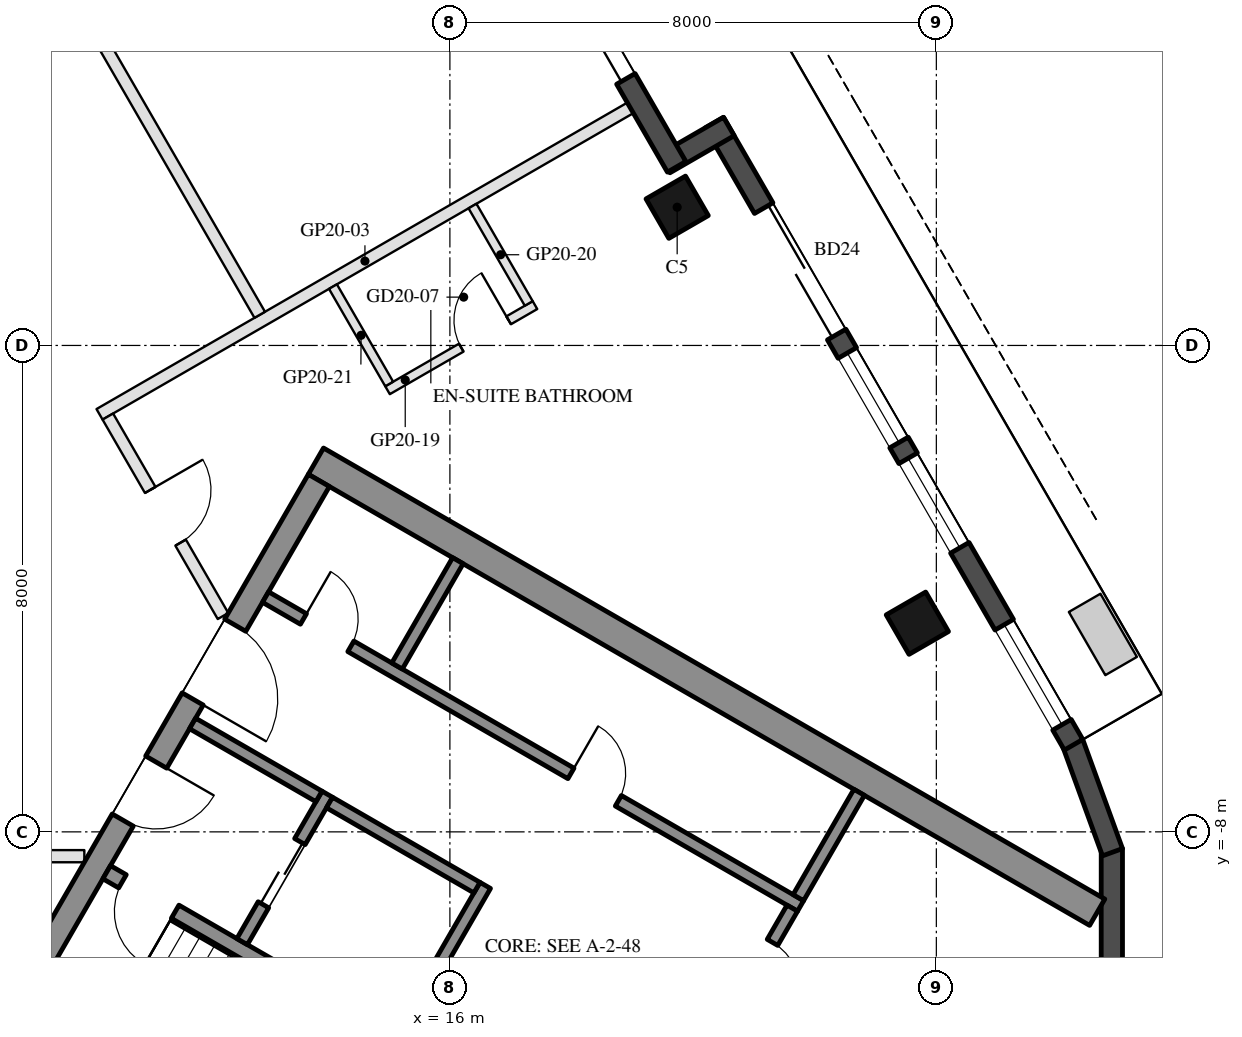
"""IFC4 building model, lengths in metres.
Left out: names, types, materials, properties, quantities, classifications, styles, units other than length and angle.
Written with IfcOpenShell. Run it as: python <this file> out.ifc"""

import sys

from ifc_helpers import new_model, si_unit, direction, frame, frame_2d, origin, origin_2d, place, context, subcontext, project, spatial, rectangle, hollow_rectangle, extrude, element, fill, save


model = new_model("IFC4")
c1 = context("Model", 3, precision=1e-05, world=origin(), true_north=direction((0.0, 1.0)))
c2 = subcontext(c1, "Body", "Model", "MODEL_VIEW")
j1 = project(units=[si_unit("LENGTHUNIT", "METRE"), si_unit("PLANEANGLEUNIT", "RADIAN")], contexts=[c1])
p1 = place(None, origin())
s1 = spatial("IfcSite", under=j1, at=p1, CompositionType="ELEMENT")
p2 = place(p1, origin())
s2 = spatial("IfcBuilding", under=s1, at=p2, CompositionType="ELEMENT")
p3 = place(p2, frame((0.0, 0.0, 209.5)))
s3 = spatial("IfcBuildingStorey", under=s2, at=p3, CompositionType="ELEMENT", Elevation=209.5)
for number, where, z_axis, x_axis in (
    (1, (23.688, -4.568, 0.0), (0.0, 0.0, 1.0), (-0.5, 0.866, 0.0)),
    (2, (19.738, 2.273, 0.0), (0.0, 0.0, 1.0), (-0.5, 0.866, 0.0)),
):
    element("IfcColumn", number, at=place(p3, frame(where, z_axis=z_axis, x_axis=x_axis)), inside=s3, PredefinedType="COLUMN", context=c2, shape_type="SweptSolid", body=[
        extrude(hollow_rectangle(XDim=0.75, YDim=0.75, WallThickness=0.035, at=origin_2d()), origin(), (0.0, 0.0, 1.0), 3.7),
    ])
for number, where, z_axis, x_axis in (
    (3, (26.244, -11.92, 0.0), (0.0, 0.0, 1.0), (0.342, 0.94, 0.0)),
    (4, (26.886, -10.185, 0.0), (0.0, 0.0, 1.0), (0.0, 1.0, 0.0)),
    (5, (26.897, -8.335, 0.0), (0.0, 0.0, 1.0), (-0.342, 0.94, 0.0)),
):
    element("IfcWall", number, at=place(p3, frame(where, z_axis=z_axis, x_axis=x_axis)), inside=s3, PredefinedType="SOLIDWALL", context=c2, shape_type="SweptSolid", body=[
        extrude(rectangle(XDim=1.91, YDim=0.35, at=frame_2d((0.955, 0.0))), origin(), (0.0, 0.0, 1.0), 3.55),
    ])
p4 = place(p3, frame((26.257, -6.567, 0.0), z_axis=(0.0, 0.0, 1.0), x_axis=(-0.500023526245, 0.866011820475, 0.0)))
e6 = element("IfcWall", 6, at=p4, inside=s3, PredefinedType="SOLIDWALL", context=c2, shape_type="SweptSolid", body=[
    extrude(rectangle(XDim=11.816, YDim=0.35, at=frame_2d((5.908, 0.0))), origin(), (0.0, 0.0, 1.0), 3.55),
])
p5 = place(p4, frame((0.38, 0.0, 0.3)))
e7 = element("IfcOpeningElement", 7, at=p5, cuts=e6, PredefinedType="OPENING", context=c2, shape_type="SweptSolid", body=[
    extrude(rectangle(XDim=1.9, YDim=2.65, at=frame_2d((0.95, 1.325))), frame((0.0, 0.185, 0.0), z_axis=(0.0, -1.0, 0.0), x_axis=(1.0, 0.0, 0.0)), (0.0, 0.0, 1.0), 0.37),
])
p6 = place(p4, frame((7.791, 0.0, 0.0)))
e8 = element("IfcOpeningElement", 8, at=p6, cuts=e6, PredefinedType="OPENING", context=c2, shape_type="SweptSolid", body=[
    extrude(rectangle(XDim=2.4, YDim=2.4, at=frame_2d((1.2, 1.2))), frame((0.0, 0.185, 0.0), z_axis=(0.0, -1.0, 0.0), x_axis=(1.0, 0.0, 0.0)), (0.0, 0.0, 1.0), 0.37),
])
p7 = place(p4, frame((3.741, 0.0, 0.3)))
e9 = element("IfcOpeningElement", 9, at=p7, cuts=e6, PredefinedType="OPENING", context=c2, shape_type="SweptSolid", body=[
    extrude(rectangle(XDim=1.7, YDim=2.65, at=frame_2d((0.85, 1.325))), frame((0.0, 0.185, 0.0), z_axis=(0.0, -1.0, 0.0), x_axis=(1.0, 0.0, 0.0)), (0.0, 0.0, 1.0), 0.37),
])
p8 = place(p4, frame((5.741, 0.0, 0.3)))
e10 = element("IfcOpeningElement", 10, at=p8, cuts=e6, PredefinedType="OPENING", context=c2, shape_type="SweptSolid", body=[
    extrude(rectangle(XDim=1.7, YDim=2.65, at=frame_2d((0.85, 1.325))), frame((0.0, 0.185, 0.0), z_axis=(0.0, -1.0, 0.0), x_axis=(1.0, 0.0, 0.0)), (0.0, 0.0, 1.0), 0.37),
])
p9 = place(p3, frame((20.588, 3.601, 0.0), z_axis=(0.0, 0.0, 1.0), x_axis=(-0.866005645448, -0.500034220881, 0.0)))
e11 = element("IfcWall", 11, at=p9, inside=s3, PredefinedType="SOLIDWALL", context=c2, shape_type="SweptSolid", body=[
    extrude(rectangle(XDim=1.22, YDim=0.35, at=frame_2d((0.61, 0.0))), origin(), (0.0, 0.0, 1.0), 3.55),
])
p10 = place(p3, frame((19.729, 2.938, 0.0), z_axis=(0.0, 0.0, 1.0), x_axis=(-0.499976430342, 0.866039011305, 0.0)))
e12 = element("IfcWall", 12, at=p10, inside=s3, PredefinedType="SOLIDWALL", context=c2, shape_type="SweptSolid", body=[
    extrude(rectangle(XDim=6.74, YDim=0.35, at=frame_2d((3.37, 0.0))), origin(), (0.0, 0.0, 1.0), 3.55),
])
p11 = place(p10, frame((1.67, 0.0, 0.0)))
e13 = element("IfcOpeningElement", 13, at=p11, cuts=e12, PredefinedType="OPENING", context=c2, shape_type="SweptSolid", body=[
    extrude(rectangle(XDim=2.4, YDim=2.4, at=frame_2d((1.2, 1.2))), frame((0.0, 0.185, 0.0), z_axis=(0.0, -1.0, 0.0), x_axis=(1.0, 0.0, 0.0)), (0.0, 0.0, 1.0), 0.37),
])
p12 = place(p10, frame((4.37, 0.0, 0.3)))
e14 = element("IfcOpeningElement", 14, at=p12, cuts=e12, PredefinedType="OPENING", context=c2, shape_type="SweptSolid", body=[
    extrude(rectangle(XDim=1.5, YDim=2.65, at=frame_2d((0.75, 1.325))), frame((0.0, 0.185, 0.0), z_axis=(0.0, -1.0, 0.0), x_axis=(1.0, 0.0, 0.0)), (0.0, 0.0, 1.0), 0.37),
])
p13 = place(p3, frame((13.797, -1.903, 0.0), z_axis=(0.0, 0.0, 1.0), x_axis=(0.866025009528, -0.500000682871, 0.0)))
e15 = element("IfcWall", 15, at=p13, inside=s3, PredefinedType="SHEAR", context=c2, shape_type="SweptSolid", body=[
    extrude(rectangle(XDim=14.837, YDim=0.5, at=frame_2d((7.418, 0.0))), origin(), (0.0, 0.0, 1.0), 3.5),
])
p14 = place(p3, frame((8.845, -10.88, 0.0), z_axis=(0.0, 0.0, 1.0), x_axis=(0.500004234368, 0.866022959057, 0.0)))
e16 = element("IfcWall", 16, at=p14, inside=s3, PredefinedType="SHEAR", context=c2, shape_type="SweptSolid", body=[
    extrude(rectangle(XDim=10.0, YDim=0.4, at=frame_2d((5.0, 0.0))), origin(), (0.0, 0.0, 1.0), 3.5),
])
p15 = place(p14, frame((3.55, 0.0, 0.0)))
e17 = element("IfcOpeningElement", 17, at=p15, cuts=e16, PredefinedType="OPENING", context=c2, shape_type="SweptSolid", body=[
    extrude(rectangle(XDim=1.1, YDim=2.1, at=frame_2d((0.55, 1.05))), frame((0.0, 0.21, 0.0), z_axis=(0.0, -1.0, 0.0), x_axis=(1.0, 0.0, 0.0)), (0.0, 0.0, 1.0), 0.42),
])
p16 = place(p14, frame((5.85, 0.0, 0.0)))
e18 = element("IfcOpeningElement", 18, at=p16, cuts=e16, PredefinedType="OPENING", context=c2, shape_type="SweptSolid", body=[
    extrude(rectangle(XDim=1.4, YDim=2.1, at=frame_2d((0.7, 1.05))), frame((0.0, 0.21, 0.0), z_axis=(0.0, -1.0, 0.0), x_axis=(1.0, 0.0, 0.0)), (0.0, 0.0, 1.0), 0.42),
])
p17 = place(p3, frame((10.356, -8.664, 0.0), z_axis=(0.0, 0.0, 1.0), x_axis=(0.866028629588, -0.499994412703, 0.0)))
e19 = element("IfcWall", 19, at=p17, inside=s3, PredefinedType="SHEAR", context=c2, shape_type="SweptSolid", body=[
    extrude(rectangle(XDim=6.45, YDim=0.25, at=frame_2d((3.225, 0.0))), origin(), (0.0, 0.0, 1.0), 3.5),
])
p18 = place(p17, frame((0.3, 0.0, 0.0)))
e20 = element("IfcOpeningElement", 20, at=p18, cuts=e19, PredefinedType="OPENING", context=c2, shape_type="SweptSolid", body=[
    extrude(rectangle(XDim=1.0, YDim=2.1, at=frame_2d((0.5, 1.05))), frame((0.0, 0.135, 0.0), z_axis=(0.0, -1.0, 0.0), x_axis=(1.0, 0.0, 0.0)), (0.0, 0.0, 1.0), 0.27),
])
p19 = place(p3, frame((15.181, -11.305, 0.0), z_axis=(0.0, 0.0, 1.0), x_axis=(0.49994636267, 0.866056369097, 0.0)))
e21 = element("IfcWall", 21, at=p19, inside=s3, PredefinedType="SHEAR", context=c2, shape_type="SweptSolid", body=[
    extrude(rectangle(XDim=2.8, YDim=0.2, at=frame_2d((1.4, 0.0))), origin(), (0.0, 0.0, 1.0), 3.5),
])
p20 = place(p3, frame((12.583, -9.805, 0.0), z_axis=(0.0, 0.0, 1.0), x_axis=(0.49994636267, 0.866056369097, 0.0)))
e22 = element("IfcWall", 22, at=p20, inside=s3, PredefinedType="SHEAR", context=c2, shape_type="SweptSolid", body=[
    extrude(rectangle(XDim=2.8, YDim=0.2, at=frame_2d((1.4, 0.0))), origin(), (0.0, 0.0, 1.0), 3.5),
])
p21 = place(p20, frame((0.7, 0.0, 0.0)))
e23 = element("IfcOpeningElement", 23, at=p21, cuts=e22, PredefinedType="OPENING", context=c2, shape_type="SweptSolid", body=[
    extrude(rectangle(XDim=1.2, YDim=2.1, at=frame_2d((0.6, 1.05))), frame((0.0, 0.11, 0.0), z_axis=(0.0, -1.0, 0.0), x_axis=(1.0, 0.0, 0.0)), (0.0, 0.0, 1.0), 0.22),
])
p22 = place(p3, frame((11.768, -6.217, 0.0), z_axis=(0.0, 0.0, 1.0), x_axis=(0.866050077142, -0.499957262057, 0.0)))
e24 = element("IfcWall", 24, at=p22, inside=s3, PredefinedType="SHEAR", context=c2, shape_type="SweptSolid", body=[
    extrude(rectangle(XDim=2.4, YDim=0.2, at=frame_2d((1.2, 0.0))), origin(), (0.0, 0.0, 1.0), 3.5),
])
p23 = place(p3, frame((14.02, -7.517, 0.0), z_axis=(0.0, 0.0, 1.0), x_axis=(0.866034573852, -0.49998411664, 0.0)))
e25 = element("IfcWall", 25, at=p23, inside=s3, PredefinedType="SHEAR", context=c2, shape_type="SweptSolid", body=[
    extrude(rectangle(XDim=2.8, YDim=0.2, at=frame_2d((1.4, 0.0))), origin(), (0.0, 0.0, 1.0), 3.5),
])
p24 = place(p3, frame((12.968, -4.138, 0.0), z_axis=(0.0, 0.0, 1.0), x_axis=(0.866028328073, -0.49999493495, 0.0)))
e26 = element("IfcWall", 26, at=p24, inside=s3, PredefinedType="SHEAR", context=c2, shape_type="SweptSolid", body=[
    extrude(rectangle(XDim=10.16, YDim=0.2, at=frame_2d((5.08, 0.0))), origin(), (0.0, 0.0, 1.0), 3.5),
])
p25 = place(p24, frame((0.72, 0.0, 0.0)))
e27 = element("IfcOpeningElement", 27, at=p25, cuts=e26, PredefinedType="OPENING", context=c2, shape_type="SweptSolid", body=[
    extrude(rectangle(XDim=0.9, YDim=2.1, at=frame_2d((0.45, 1.05))), frame((0.0, 0.11, 0.0), z_axis=(0.0, -1.0, 0.0), x_axis=(1.0, 0.0, 0.0)), (0.0, 0.0, 1.0), 0.22),
])
p26 = place(p24, frame((5.8, 0.0, 0.0)))
e28 = element("IfcOpeningElement", 28, at=p26, cuts=e26, PredefinedType="OPENING", context=c2, shape_type="SweptSolid", body=[
    extrude(rectangle(XDim=0.9, YDim=2.1, at=frame_2d((0.45, 1.05))), frame((0.0, 0.11, 0.0), z_axis=(0.0, -1.0, 0.0), x_axis=(1.0, 0.0, 0.0)), (0.0, 0.0, 1.0), 0.22),
])
p27 = place(p3, frame((20.43, -11.333, 0.0), z_axis=(0.0, 0.0, 1.0), x_axis=(0.500001309137, 0.866024647952, 0.0)))
e29 = element("IfcWall", 29, at=p27, inside=s3, PredefinedType="SHEAR", context=c2, shape_type="SweptSolid", body=[
    extrude(rectangle(XDim=2.4, YDim=0.2, at=frame_2d((1.2, 0.0))), origin(), (0.0, 0.0, 1.0), 3.5),
])
p28 = place(p27, frame((0.85, 0.0, 0.0)))
e30 = element("IfcOpeningElement", 30, at=p28, cuts=e29, PredefinedType="OPENING", context=c2, shape_type="SweptSolid", body=[
    extrude(rectangle(XDim=0.9, YDim=2.1, at=frame_2d((0.45, 1.05))), frame((0.0, 0.11, 0.0), z_axis=(0.0, -1.0, 0.0), x_axis=(1.0, 0.0, 0.0)), (0.0, 0.0, 1.0), 0.22),
])
for number, where, z_axis, x_axis in (
    (31, (15.131, -5.272, 0.0), (0.0, 0.0, 1.0), (0.5, 0.866, 0.0)),
    (32, (21.73, -9.082, 0.0), (0.0, 0.0, 1.0), (0.5, 0.866, 0.0)),
):
    element("IfcWall", number, at=place(p3, frame(where, z_axis=z_axis, x_axis=x_axis)), inside=s3, PredefinedType="SHEAR", context=c2, shape_type="SweptSolid", body=[
        extrude(rectangle(XDim=2.0, YDim=0.2, at=frame_2d((1.0, 0.0))), origin(), (0.0, 0.0, 1.0), 3.5),
    ])
p29 = place(p3, frame((18.968, 3.907, 0.0), z_axis=(0.0, 0.0, 1.0), x_axis=(-0.866022637375, -0.500004791531, 0.0)))
e33 = element("IfcWall", 33, at=p29, inside=s3, PredefinedType="PARTITIONING", context=c2, shape_type="SweptSolid", body=[
    extrude(rectangle(XDim=10.08, YDim=0.2, at=frame_2d((5.04, 0.0))), origin(), (0.0, 0.0, 1.0), 3.06),
])
p30 = place(p3, frame((9.988, -8.4, 0.0), z_axis=(0.0, 0.0, 1.0), x_axis=(-1.0, 0.0, 0.0)))
e34 = element("IfcWall", 34, at=p30, inside=s3, PredefinedType="PARTITIONING", context=c2, shape_type="SweptSolid", body=[
    extrude(rectangle(XDim=6.385, YDim=0.2, at=frame_2d((3.192, 0.0))), origin(), (0.0, 0.0, 1.0), 2.95),
])
p31 = place(p30, frame((2.692, 0.0, 0.0)))
e35 = element("IfcOpeningElement", 35, at=p31, cuts=e34, PredefinedType="OPENING", context=c2, shape_type="SweptSolid", body=[
    extrude(rectangle(XDim=1.0, YDim=2.1, at=frame_2d((0.5, 1.05))), frame((0.0, 0.11, 0.0), z_axis=(0.0, -1.0, 0.0), x_axis=(1.0, 0.0, 0.0)), (0.0, 0.0, 1.0), 0.22),
])
p32 = place(p3, frame((10.375, -1.169, 0.0), z_axis=(0.0, 0.0, 1.0), x_axis=(0.500055316652, -0.865993464345, 0.0)))
e36 = element("IfcWall", 36, at=p32, inside=s3, PredefinedType="PARTITIONING", context=c2, shape_type="SweptSolid", body=[
    extrude(rectangle(XDim=3.788, YDim=0.2, at=frame_2d((1.894, 0.0))), origin(), (0.0, 0.0, 1.0), 2.95),
])
p33 = place(p32, frame((1.394, 0.0, 0.0)))
e37 = element("IfcOpeningElement", 37, at=p33, cuts=e36, PredefinedType="OPENING", context=c2, shape_type="SweptSolid", body=[
    extrude(rectangle(XDim=1.0, YDim=2.1, at=frame_2d((0.5, 1.05))), frame((0.0, 0.11, 0.0), z_axis=(0.0, -1.0, 0.0), x_axis=(1.0, 0.0, 0.0)), (0.0, 0.0, 1.0), 0.22),
])
p34 = place(p3, frame((14.974, -0.737, 0.0), z_axis=(0.0, 0.0, 1.0), x_axis=(0.866018616679, 0.500011755427, 0.0)))
e38 = element("IfcWall", 38, at=p34, inside=s3, PredefinedType="PARTITIONING", context=c2, shape_type="SweptSolid", body=[
    extrude(rectangle(XDim=2.8, YDim=0.15, at=frame_2d((1.4, 0.0))), origin(), (0.0, 0.0, 1.0), 3.55),
])
p35 = place(p34, frame((1.4, 0.0, 0.0)))
e39 = element("IfcOpeningElement", 39, at=p35, cuts=e38, PredefinedType="OPENING", context=c2, shape_type="SweptSolid", body=[
    extrude(rectangle(XDim=0.9, YDim=2.1, at=frame_2d((0.45, 1.05))), frame((0.0, 0.085, 0.0), z_axis=(0.0, -1.0, 0.0), x_axis=(1.0, 0.0, 0.0)), (0.0, 0.0, 1.0), 0.17),
])
p36 = place(p3, frame((17.297, 0.691, 0.0), z_axis=(0.0, 0.0, 1.0), x_axis=(-0.499985172903, 0.866033964044, 0.0)))
e40 = element("IfcWall", 40, at=p36, inside=s3, PredefinedType="PARTITIONING", context=c2, shape_type="SweptSolid", body=[
    extrude(rectangle(XDim=1.85, YDim=0.15, at=frame_2d((0.925, 0.0))), origin(), (0.0, 0.0, 1.0), 2.95),
])
p37 = place(p3, frame((15.002, -0.634, 0.0), z_axis=(0.0, 0.0, 1.0), x_axis=(-0.500042316284, 0.866000971088, 0.0)))
e41 = element("IfcWall", 41, at=p37, inside=s3, PredefinedType="PARTITIONING", context=c2, shape_type="SweptSolid", body=[
    extrude(rectangle(XDim=1.85, YDim=0.15, at=frame_2d((0.925, 0.0))), origin(), (0.0, 0.0, 1.0), 2.95),
])
p38 = place(p3, frame((7.101, 10.501, 0.0), z_axis=(0.0, 0.0, 1.0), x_axis=(0.500001329633, -0.866024636119, 0.0)))
e42 = element("IfcWall", 42, at=p38, inside=s3, PredefinedType="PARTITIONING", context=c2, shape_type="SweptSolid", body=[
    extrude(rectangle(XDim=11.544, YDim=0.2, at=frame_2d((5.772, 0.0))), origin(), (0.0, 0.0, 1.0), 2.95),
])
p39 = place(p38, frame((2.455, 0.0, 0.0)))
e43 = element("IfcOpeningElement", 43, at=p39, cuts=e42, PredefinedType="OPENING", context=c2, shape_type="SweptSolid", body=[
    extrude(rectangle(XDim=1.0, YDim=2.1, at=frame_2d((0.5, 1.05))), frame((0.0, 0.11, 0.0), z_axis=(0.0, -1.0, 0.0), x_axis=(1.0, 0.0, 0.0)), (0.0, 0.0, 1.0), 0.22),
])
p40 = place(p5, origin())
e44 = element("IfcWindow", 44, at=p40, inside=s3, PartitioningType="SINGLE_PANEL", PredefinedType="WINDOW", context=c2, shape_type="SweptSolid", body=[
    extrude(rectangle(XDim=1.9, YDim=2.65, at=frame_2d((0.95, 1.325))), frame((0.0, 0.03, 0.0), z_axis=(0.0, -1.0, 0.0), x_axis=(1.0, 0.0, 0.0)), (0.0, 0.0, 1.0), 0.06),
])
fill(e7, e44)
p41 = place(p6, frame((2.4, 0.0, 0.0), z_axis=(0.0, 0.0, 1.0), x_axis=(-1.0, 0.0, 0.0)))
e45 = element("IfcDoor", 45, at=p41, inside=s3, OperationType="SLIDING_TO_LEFT", PredefinedType="DOOR", context=c2, shape_type="SweptSolid", body=[
    extrude(rectangle(XDim=2.4, YDim=2.4, at=frame_2d((1.2, 1.2))), frame((0.0, 0.025, 0.0), z_axis=(0.0, -1.0, 0.0), x_axis=(1.0, 0.0, 0.0)), (0.0, 0.0, 1.0), 0.05),
])
fill(e8, e45)
p42 = place(p7, origin())
e46 = element("IfcWindow", 46, at=p42, inside=s3, PartitioningType="SINGLE_PANEL", PredefinedType="WINDOW", context=c2, shape_type="SweptSolid", body=[
    extrude(rectangle(XDim=1.7, YDim=2.65, at=frame_2d((0.85, 1.325))), frame((0.0, 0.03, 0.0), z_axis=(0.0, -1.0, 0.0), x_axis=(1.0, 0.0, 0.0)), (0.0, 0.0, 1.0), 0.06),
])
fill(e9, e46)
p43 = place(p8, origin())
e47 = element("IfcWindow", 47, at=p43, inside=s3, PartitioningType="SINGLE_PANEL", PredefinedType="WINDOW", context=c2, shape_type="SweptSolid", body=[
    extrude(rectangle(XDim=1.7, YDim=2.65, at=frame_2d((0.85, 1.325))), frame((0.0, 0.03, 0.0), z_axis=(0.0, -1.0, 0.0), x_axis=(1.0, 0.0, 0.0)), (0.0, 0.0, 1.0), 0.06),
])
fill(e10, e47)
p44 = place(p11, frame((2.4, 0.0, 0.0), z_axis=(0.0, 0.0, 1.0), x_axis=(-1.0, 0.0, 0.0)))
e48 = element("IfcDoor", 48, at=p44, inside=s3, OperationType="SLIDING_TO_LEFT", PredefinedType="DOOR", context=c2, shape_type="SweptSolid", body=[
    extrude(rectangle(XDim=2.4, YDim=2.4, at=frame_2d((1.2, 1.2))), frame((0.0, 0.025, 0.0), z_axis=(0.0, -1.0, 0.0), x_axis=(1.0, 0.0, 0.0)), (0.0, 0.0, 1.0), 0.05),
])
fill(e13, e48)
p45 = place(p21, origin())
e49 = element("IfcDoor", 49, at=p45, inside=s3, OperationType="DOUBLE_DOOR_SLIDING", PredefinedType="DOOR", context=c2, shape_type="SweptSolid", body=[
    extrude(rectangle(XDim=1.2, YDim=2.1, at=frame_2d((0.6, 1.05))), frame((0.0, 0.025, 0.0), z_axis=(0.0, -1.0, 0.0), x_axis=(1.0, 0.0, 0.0)), (0.0, 0.0, 1.0), 0.05),
])
fill(e23, e49)
p46 = place(p25, origin())
e50 = element("IfcDoor", 50, at=p46, inside=s3, OperationType="SINGLE_SWING_LEFT", PredefinedType="DOOR", context=c2, shape_type="SweptSolid", body=[
    extrude(rectangle(XDim=0.9, YDim=2.1, at=frame_2d((0.45, 1.05))), frame((0.0, 0.025, 0.0), z_axis=(0.0, -1.0, 0.0), x_axis=(1.0, 0.0, 0.0)), (0.0, 0.0, 1.0), 0.05),
])
fill(e27, e50)
p47 = place(p26, origin())
e51 = element("IfcDoor", 51, at=p47, inside=s3, OperationType="SINGLE_SWING_LEFT", PredefinedType="DOOR", context=c2, shape_type="SweptSolid", body=[
    extrude(rectangle(XDim=0.9, YDim=2.1, at=frame_2d((0.45, 1.05))), frame((0.0, 0.025, 0.0), z_axis=(0.0, -1.0, 0.0), x_axis=(1.0, 0.0, 0.0)), (0.0, 0.0, 1.0), 0.05),
])
fill(e28, e51)
p48 = place(p28, frame((0.9, 0.0, 0.0), z_axis=(0.0, 0.0, 1.0), x_axis=(-1.0, 0.0, 0.0)))
e52 = element("IfcDoor", 52, at=p48, inside=s3, OperationType="SINGLE_SWING_RIGHT", PredefinedType="DOOR", context=c2, shape_type="SweptSolid", body=[
    extrude(rectangle(XDim=0.9, YDim=2.1, at=frame_2d((0.45, 1.05))), frame((0.0, 0.025, 0.0), z_axis=(0.0, -1.0, 0.0), x_axis=(1.0, 0.0, 0.0)), (0.0, 0.0, 1.0), 0.05),
])
fill(e30, e52)
p49 = place(p15, frame((1.1, 0.0, 0.0), z_axis=(0.0, 0.0, 1.0), x_axis=(-1.0, 0.0, 0.0)))
e53 = element("IfcDoor", 53, at=p49, inside=s3, OperationType="SINGLE_SWING_LEFT", PredefinedType="DOOR", context=c2, shape_type="SweptSolid", body=[
    extrude(rectangle(XDim=1.1, YDim=2.1, at=frame_2d((0.55, 1.05))), frame((0.0, 0.025, 0.0), z_axis=(0.0, -1.0, 0.0), x_axis=(1.0, 0.0, 0.0)), (0.0, 0.0, 1.0), 0.05),
])
fill(e17, e53)
p50 = place(p16, frame((1.4, 0.0, 0.0), z_axis=(0.0, 0.0, 1.0), x_axis=(-1.0, 0.0, 0.0)))
e54 = element("IfcDoor", 54, at=p50, inside=s3, OperationType="DOUBLE_DOOR_SINGLE_SWING", PredefinedType="DOOR", context=c2, shape_type="SweptSolid", body=[
    extrude(rectangle(XDim=1.4, YDim=2.1, at=frame_2d((0.7, 1.05))), frame((0.0, 0.025, 0.0), z_axis=(0.0, -1.0, 0.0), x_axis=(1.0, 0.0, 0.0)), (0.0, 0.0, 1.0), 0.05),
])
fill(e18, e54)
p51 = place(p18, frame((1.0, 0.0, 0.0), z_axis=(0.0, 0.0, 1.0), x_axis=(-1.0, 0.0, 0.0)))
e55 = element("IfcDoor", 55, at=p51, inside=s3, OperationType="SINGLE_SWING_LEFT", PredefinedType="DOOR", context=c2, shape_type="SweptSolid", body=[
    extrude(rectangle(XDim=1.0, YDim=2.1, at=frame_2d((0.5, 1.05))), frame((0.0, 0.025, 0.0), z_axis=(0.0, -1.0, 0.0), x_axis=(1.0, 0.0, 0.0)), (0.0, 0.0, 1.0), 0.05),
])
fill(e20, e55)
p52 = place(p35, origin())
e56 = element("IfcDoor", 56, at=p52, inside=s3, OperationType="SINGLE_SWING_RIGHT", PredefinedType="DOOR", context=c2, shape_type="SweptSolid", body=[
    extrude(rectangle(XDim=0.9, YDim=2.1, at=frame_2d((0.45, 1.05))), frame((0.0, 0.025, 0.0), z_axis=(0.0, -1.0, 0.0), x_axis=(1.0, 0.0, 0.0)), (0.0, 0.0, 1.0), 0.05),
])
fill(e39, e56)
p53 = place(p33, origin())
e57 = element("IfcDoor", 57, at=p53, inside=s3, OperationType="SINGLE_SWING_LEFT", PredefinedType="DOOR", context=c2, shape_type="SweptSolid", body=[
    extrude(rectangle(XDim=1.0, YDim=2.1, at=frame_2d((0.5, 1.05))), frame((0.0, 0.025, 0.0), z_axis=(0.0, -1.0, 0.0), x_axis=(1.0, 0.0, 0.0)), (0.0, 0.0, 1.0), 0.05),
])
fill(e37, e57)
save(model, sys.argv[1])
